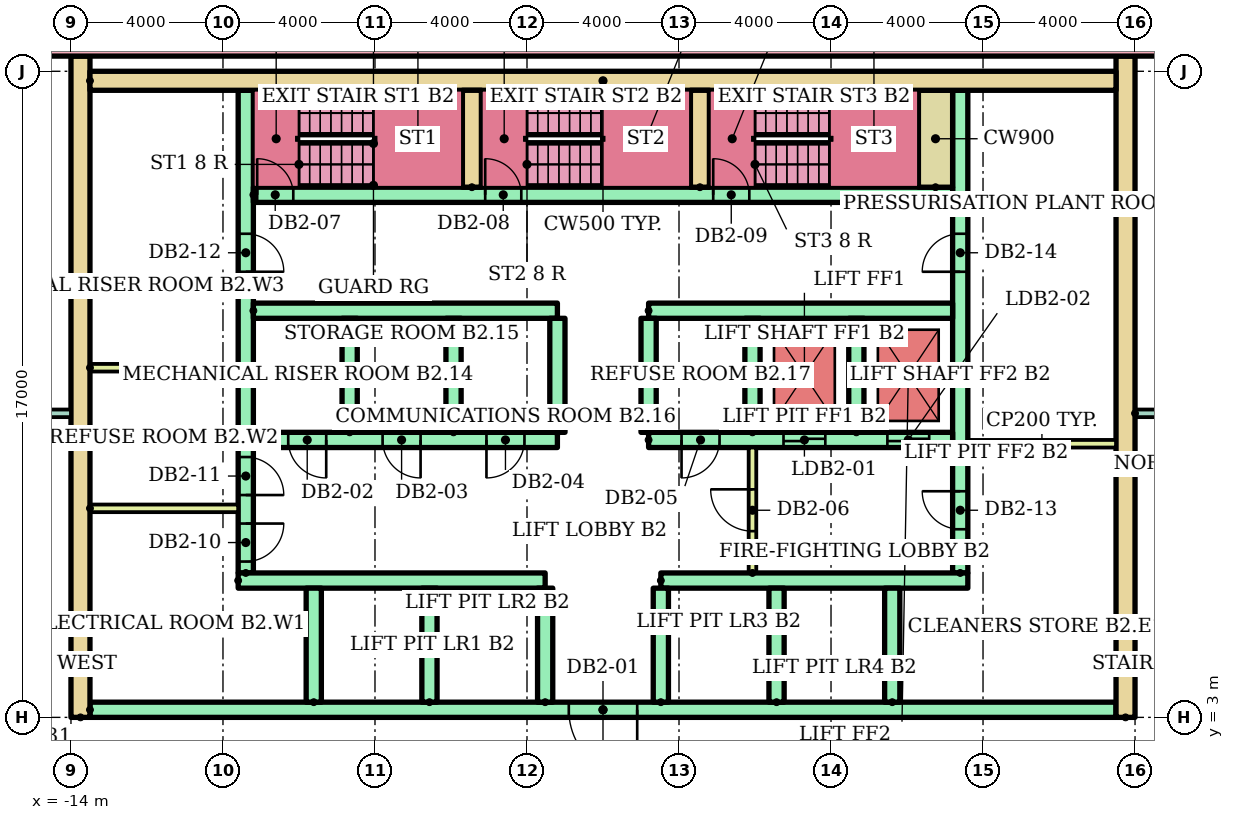
"""IFC4 building model, lengths in metres.
Left out: names, types, materials, properties, quantities, classifications, styles, units other than length and angle.
Written with IfcOpenShell. Run it as: python <this file> out.ifc"""

import sys

from ifc_helpers import new_model, si_unit, direction, frame, frame_2d, origin, place, context, subcontext, project, spatial, rectangle, extrude, element, fill, save


model = new_model("IFC4")
c1 = context("Model", 3, precision=1e-05, world=origin(), true_north=direction((0.0, 1.0)))
c2 = subcontext(c1, "Body", "Model", "MODEL_VIEW")
j1 = project(units=[si_unit("LENGTHUNIT", "METRE"), si_unit("PLANEANGLEUNIT", "RADIAN")], contexts=[c1])
p1 = place(None, origin())
s1 = spatial("IfcSite", under=j1, at=p1, CompositionType="ELEMENT")
p2 = place(p1, origin())
s2 = spatial("IfcBuilding", under=s1, at=p2, CompositionType="ELEMENT")
p3 = place(p2, frame((0.0, 0.0, -10.0)))
s3 = spatial("IfcBuildingStorey", under=s2, at=p3, CompositionType="ELEMENT", Elevation=-10.0)
p4 = place(p3, frame((-41.0, 20.7, -0.3)))
e1 = element("IfcWall", 1, at=p4, inside=s3, PredefinedType="SOLIDWALL", context=c2, shape_type="SweptSolid", body=[
    extrude(rectangle(XDim=82.0, YDim=0.6, at=frame_2d((41.0, 0.0))), origin(), (0.0, 0.0, 1.0), 4.95),
])
for number, where, z_axis, x_axis in (
    (2, (-13.75, 3.0, 0.0), (0.0, 0.0, 1.0), (0.0, 1.0, 0.0)),
    (3, (13.75, 3.0, 0.0), (0.0, 0.0, 1.0), (0.0, 1.0, 0.0)),
):
    element("IfcWall", number, at=place(p3, frame(where, z_axis=z_axis, x_axis=x_axis)), inside=s3, PredefinedType="SHEAR", context=c2, shape_type="SweptSolid", body=[
        extrude(rectangle(XDim=17.4, YDim=0.5, at=frame_2d((8.7, 0.0))), origin(), (0.0, 0.0, 1.0), 4.65),
    ])
p5 = place(p3, frame((-13.5, 19.75, 0.0)))
e4 = element("IfcWall", 4, at=p5, inside=s3, PredefinedType="SHEAR", context=c2, shape_type="SweptSolid", body=[
    extrude(rectangle(XDim=27.0, YDim=0.5, at=frame_2d((13.5, 0.0))), origin(), (0.0, 0.0, 1.0), 4.65),
])
p6 = place(p3, frame((-9.4, 6.8, 0.0), z_axis=(0.0, 0.0, 1.0), x_axis=(0.0, 1.0, 0.0)))
e5 = element("IfcWall", 5, at=p6, inside=s3, PredefinedType="SHEAR", context=c2, shape_type="SweptSolid", body=[
    extrude(rectangle(XDim=12.7, YDim=0.4, at=frame_2d((6.35, 0.0))), origin(), (0.0, 0.0, 1.0), 4.65),
])
p7 = place(p6, frame((0.3, 0.0, 0.0)))
e6 = element("IfcOpeningElement", 6, at=p7, cuts=e5, PredefinedType="OPENING", context=c2, shape_type="SweptSolid", body=[
    extrude(rectangle(XDim=1.0, YDim=2.1, at=frame_2d((0.5, 1.05))), frame((0.0, 0.21, 0.0), z_axis=(0.0, -1.0, 0.0), x_axis=(1.0, 0.0, 0.0)), (0.0, 0.0, 1.0), 0.42),
])
p8 = place(p6, frame((2.05, 0.0, 0.0)))
e7 = element("IfcOpeningElement", 7, at=p8, cuts=e5, PredefinedType="OPENING", context=c2, shape_type="SweptSolid", body=[
    extrude(rectangle(XDim=1.0, YDim=2.1, at=frame_2d((0.5, 1.05))), frame((0.0, 0.21, 0.0), z_axis=(0.0, -1.0, 0.0), x_axis=(1.0, 0.0, 0.0)), (0.0, 0.0, 1.0), 0.42),
])
p9 = place(p6, frame((7.925, 0.0, 0.0)))
e8 = element("IfcOpeningElement", 8, at=p9, cuts=e5, PredefinedType="OPENING", context=c2, shape_type="SweptSolid", body=[
    extrude(rectangle(XDim=1.0, YDim=2.1, at=frame_2d((0.5, 1.05))), frame((0.0, 0.21, 0.0), z_axis=(0.0, -1.0, 0.0), x_axis=(1.0, 0.0, 0.0)), (0.0, 0.0, 1.0), 0.42),
])
p10 = place(p3, frame((9.4, 6.8, 0.0), z_axis=(0.0, 0.0, 1.0), x_axis=(0.0, 1.0, 0.0)))
e9 = element("IfcWall", 9, at=p10, inside=s3, PredefinedType="SHEAR", context=c2, shape_type="SweptSolid", body=[
    extrude(rectangle(XDim=12.7, YDim=0.4, at=frame_2d((6.35, 0.0))), origin(), (0.0, 0.0, 1.0), 4.65),
])
p11 = place(p10, frame((1.15, 0.0, 0.0)))
e10 = element("IfcOpeningElement", 10, at=p11, cuts=e9, PredefinedType="OPENING", context=c2, shape_type="SweptSolid", body=[
    extrude(rectangle(XDim=1.0, YDim=2.1, at=frame_2d((0.5, 1.05))), frame((0.0, 0.21, 0.0), z_axis=(0.0, -1.0, 0.0), x_axis=(1.0, 0.0, 0.0)), (0.0, 0.0, 1.0), 0.42),
])
p12 = place(p10, frame((7.925, 0.0, 0.0)))
e11 = element("IfcOpeningElement", 11, at=p12, cuts=e9, PredefinedType="OPENING", context=c2, shape_type="SweptSolid", body=[
    extrude(rectangle(XDim=1.0, YDim=2.1, at=frame_2d((0.5, 1.05))), frame((0.0, 0.21, 0.0), z_axis=(0.0, -1.0, 0.0), x_axis=(1.0, 0.0, 0.0)), (0.0, 0.0, 1.0), 0.42),
])
p13 = place(p3, frame((-13.5, 3.2, 0.0)))
e12 = element("IfcWall", 12, at=p13, inside=s3, PredefinedType="SHEAR", context=c2, shape_type="SweptSolid", body=[
    extrude(rectangle(XDim=27.0, YDim=0.4, at=frame_2d((13.5, 0.0))), origin(), (0.0, 0.0, 1.0), 4.65),
])
p14 = place(p13, frame((12.6, 0.0, 0.0)))
e13 = element("IfcOpeningElement", 13, at=p14, cuts=e12, PredefinedType="OPENING", context=c2, shape_type="SweptSolid", body=[
    extrude(rectangle(XDim=1.8, YDim=2.1, at=frame_2d((0.9, 1.05))), frame((0.0, 0.21, 0.0), z_axis=(0.0, -1.0, 0.0), x_axis=(1.0, 0.0, 0.0)), (0.0, 0.0, 1.0), 0.42),
])
for number, where in (
    (14, (-9.6, 6.6, 0.0)),
    (15, (1.522, 6.6, 0.0)),
):
    element("IfcWall", number, at=place(p3, frame(where)), inside=s3, PredefinedType="SHEAR", context=c2, shape_type="SweptSolid", body=[
        extrude(rectangle(XDim=8.078, YDim=0.4, at=frame_2d((4.039, 0.0))), origin(), (0.0, 0.0, 1.0), 4.65),
    ])
for number, where, z_axis, x_axis in (
    (16, (-7.611, 3.4, 0.0), (0.0, 0.0, 1.0), (0.0, 1.0, 0.0)),
    (17, (-4.567, 3.4, 0.0), (0.0, 0.0, 1.0), (0.0, 1.0, 0.0)),
    (18, (-1.522, 3.4, 0.0), (0.0, 0.0, 1.0), (0.0, 1.0, 0.0)),
    (19, (1.522, 3.4, 0.0), (0.0, 0.0, 1.0), (0.0, 1.0, 0.0)),
    (20, (4.567, 3.4, 0.0), (0.0, 0.0, 1.0), (0.0, 1.0, 0.0)),
    (21, (7.611, 3.4, 0.0), (0.0, 0.0, 1.0), (0.0, 1.0, 0.0)),
):
    element("IfcWall", number, at=place(p3, frame(where, z_axis=z_axis, x_axis=x_axis)), inside=s3, PredefinedType="SHEAR", context=c2, shape_type="SweptSolid", body=[
        extrude(rectangle(XDim=3.0, YDim=0.4, at=frame_2d((1.5, 0.0))), origin(), (0.0, 0.0, 1.0), 4.65),
    ])
p15 = place(p3, frame((-9.2, 10.3, 0.0)))
e22 = element("IfcWall", 22, at=p15, inside=s3, PredefinedType="SHEAR", context=c2, shape_type="SweptSolid", body=[
    extrude(rectangle(XDim=8.0, YDim=0.4, at=frame_2d((4.0, 0.0))), origin(), (0.0, 0.0, 1.0), 4.65),
])
p16 = place(p15, frame((0.917, 0.0, 0.0)))
e23 = element("IfcOpeningElement", 23, at=p16, cuts=e22, PredefinedType="OPENING", context=c2, shape_type="SweptSolid", body=[
    extrude(rectangle(XDim=1.0, YDim=2.1, at=frame_2d((0.5, 1.05))), frame((0.0, 0.21, 0.0), z_axis=(0.0, -1.0, 0.0), x_axis=(1.0, 0.0, 0.0)), (0.0, 0.0, 1.0), 0.42),
])
p17 = place(p15, frame((3.4, 0.0, 0.0)))
e24 = element("IfcOpeningElement", 24, at=p17, cuts=e22, PredefinedType="OPENING", context=c2, shape_type="SweptSolid", body=[
    extrude(rectangle(XDim=1.0, YDim=2.1, at=frame_2d((0.5, 1.05))), frame((0.0, 0.21, 0.0), z_axis=(0.0, -1.0, 0.0), x_axis=(1.0, 0.0, 0.0)), (0.0, 0.0, 1.0), 0.42),
])
p18 = place(p15, frame((6.133, 0.0, 0.0)))
e25 = element("IfcOpeningElement", 25, at=p18, cuts=e22, PredefinedType="OPENING", context=c2, shape_type="SweptSolid", body=[
    extrude(rectangle(XDim=1.0, YDim=2.1, at=frame_2d((0.5, 1.05))), frame((0.0, 0.21, 0.0), z_axis=(0.0, -1.0, 0.0), x_axis=(1.0, 0.0, 0.0)), (0.0, 0.0, 1.0), 0.42),
])
p19 = place(p3, frame((-9.2, 13.7, 0.0)))
e26 = element("IfcWall", 26, at=p19, inside=s3, PredefinedType="SHEAR", context=c2, shape_type="SweptSolid", body=[
    extrude(rectangle(XDim=8.0, YDim=0.4, at=frame_2d((4.0, 0.0))), origin(), (0.0, 0.0, 1.0), 4.65),
])
p20 = place(p3, frame((1.2, 10.3, 0.0)))
e27 = element("IfcWall", 27, at=p20, inside=s3, PredefinedType="SHEAR", context=c2, shape_type="SweptSolid", body=[
    extrude(rectangle(XDim=8.0, YDim=0.4, at=frame_2d((4.0, 0.0))), origin(), (0.0, 0.0, 1.0), 4.65),
])
p21 = place(p20, frame((3.55, 0.0, 0.0)))
e28 = element("IfcOpeningElement", 28, at=p21, cuts=e27, PredefinedType="OPENING", context=c2, shape_type="SweptSolid", body=[
    extrude(rectangle(XDim=1.1, YDim=2.1, at=frame_2d((0.55, 1.05))), frame((0.0, 0.21, 0.0), z_axis=(0.0, -1.0, 0.0), x_axis=(1.0, 0.0, 0.0)), (0.0, 0.0, 1.0), 0.42),
])
p22 = place(p20, frame((6.283, 0.0, 0.0)))
e29 = element("IfcOpeningElement", 29, at=p22, cuts=e27, PredefinedType="OPENING", context=c2, shape_type="SweptSolid", body=[
    extrude(rectangle(XDim=1.1, YDim=2.1, at=frame_2d((0.55, 1.05))), frame((0.0, 0.21, 0.0), z_axis=(0.0, -1.0, 0.0), x_axis=(1.0, 0.0, 0.0)), (0.0, 0.0, 1.0), 0.42),
])
p23 = place(p20, frame((0.867, 0.0, 0.0)))
e30 = element("IfcOpeningElement", 30, at=p23, cuts=e27, PredefinedType="OPENING", context=c2, shape_type="SweptSolid", body=[
    extrude(rectangle(XDim=1.0, YDim=2.1, at=frame_2d((0.5, 1.05))), frame((0.0, 0.21, 0.0), z_axis=(0.0, -1.0, 0.0), x_axis=(1.0, 0.0, 0.0)), (0.0, 0.0, 1.0), 0.42),
])
p24 = place(p3, frame((1.2, 13.7, 0.0)))
e31 = element("IfcWall", 31, at=p24, inside=s3, PredefinedType="SHEAR", context=c2, shape_type="SweptSolid", body=[
    extrude(rectangle(XDim=8.0, YDim=0.4, at=frame_2d((4.0, 0.0))), origin(), (0.0, 0.0, 1.0), 4.65),
])
for number, where, z_axis, x_axis in (
    (32, (-6.667, 10.5, 0.0), (0.0, 0.0, 1.0), (0.0, 1.0, 0.0)),
    (33, (-3.933, 10.5, 0.0), (0.0, 0.0, 1.0), (0.0, 1.0, 0.0)),
    (34, (-1.2, 10.5, 0.0), (0.0, 0.0, 1.0), (0.0, 1.0, 0.0)),
    (35, (1.2, 10.5, 0.0), (0.0, 0.0, 1.0), (0.0, 1.0, 0.0)),
    (36, (3.933, 10.5, 0.0), (0.0, 0.0, 1.0), (0.0, 1.0, 0.0)),
    (37, (6.667, 10.5, 0.0), (0.0, 0.0, 1.0), (0.0, 1.0, 0.0)),
):
    element("IfcWall", number, at=place(p3, frame(where, z_axis=z_axis, x_axis=x_axis)), inside=s3, PredefinedType="SHEAR", context=c2, shape_type="SweptSolid", body=[
        extrude(rectangle(XDim=3.0, YDim=0.4, at=frame_2d((1.5, 0.0))), origin(), (0.0, 0.0, 1.0), 4.65),
    ])
p25 = place(p3, frame((3.933, 6.8, 0.0), z_axis=(0.0, 0.0, 1.0), x_axis=(0.0, 1.0, 0.0)))
e38 = element("IfcWall", 38, at=p25, inside=s3, PredefinedType="PARTITIONING", context=c2, shape_type="SweptSolid", body=[
    extrude(rectangle(XDim=3.3, YDim=0.2, at=frame_2d((1.65, 0.0))), origin(), (0.0, 0.0, 1.0), 4.65),
])
p26 = place(p25, frame((1.1, 0.0, 0.0)))
e39 = element("IfcOpeningElement", 39, at=p26, cuts=e38, PredefinedType="OPENING", context=c2, shape_type="SweptSolid", body=[
    extrude(rectangle(XDim=1.1, YDim=2.1, at=frame_2d((0.55, 1.05))), frame((0.0, 0.11, 0.0), z_axis=(0.0, -1.0, 0.0), x_axis=(1.0, 0.0, 0.0)), (0.0, 0.0, 1.0), 0.22),
])
p27 = place(p3, frame((-9.2, 16.75, 0.0)))
e40 = element("IfcWall", 40, at=p27, inside=s3, PredefinedType="SHEAR", context=c2, shape_type="SweptSolid", body=[
    extrude(rectangle(XDim=18.4, YDim=0.4, at=frame_2d((9.2, 0.0))), origin(), (0.0, 0.0, 1.0), 4.65),
])
p28 = place(p27, frame((0.1, 0.0, 0.0)))
e41 = element("IfcOpeningElement", 41, at=p28, cuts=e40, PredefinedType="OPENING", context=c2, shape_type="SweptSolid", body=[
    extrude(rectangle(XDim=0.95, YDim=2.1, at=frame_2d((0.475, 1.05))), frame((0.0, 0.21, 0.0), z_axis=(0.0, -1.0, 0.0), x_axis=(1.0, 0.0, 0.0)), (0.0, 0.0, 1.0), 0.42),
])
p29 = place(p27, frame((6.1, 0.0, 0.0)))
e42 = element("IfcOpeningElement", 42, at=p29, cuts=e40, PredefinedType="OPENING", context=c2, shape_type="SweptSolid", body=[
    extrude(rectangle(XDim=0.95, YDim=2.1, at=frame_2d((0.475, 1.05))), frame((0.0, 0.21, 0.0), z_axis=(0.0, -1.0, 0.0), x_axis=(1.0, 0.0, 0.0)), (0.0, 0.0, 1.0), 0.42),
])
p30 = place(p27, frame((12.1, 0.0, 0.0)))
e43 = element("IfcOpeningElement", 43, at=p30, cuts=e40, PredefinedType="OPENING", context=c2, shape_type="SweptSolid", body=[
    extrude(rectangle(XDim=0.95, YDim=2.1, at=frame_2d((0.475, 1.05))), frame((0.0, 0.21, 0.0), z_axis=(0.0, -1.0, 0.0), x_axis=(1.0, 0.0, 0.0)), (0.0, 0.0, 1.0), 0.42),
])
for number, where, z_axis, x_axis in (
    (44, (-3.45, 16.95, 0.0), (0.0, 0.0, 1.0), (0.0, 1.0, 0.0)),
    (45, (2.55, 16.95, 0.0), (0.0, 0.0, 1.0), (0.0, 1.0, 0.0)),
):
    element("IfcWall", number, at=place(p3, frame(where, z_axis=z_axis, x_axis=x_axis)), inside=s3, PredefinedType="SHEAR", context=c2, shape_type="SweptSolid", body=[
        extrude(rectangle(XDim=2.55, YDim=0.5, at=frame_2d((1.275, 0.0))), origin(), (0.0, 0.0, 1.0), 4.65),
    ])
p31 = place(p3, frame((8.75, 16.95, 0.0), z_axis=(0.0, 0.0, 1.0), x_axis=(0.0, 1.0, 0.0)))
e46 = element("IfcWall", 46, at=p31, inside=s3, PredefinedType="SHEAR", context=c2, shape_type="SweptSolid", body=[
    extrude(rectangle(XDim=2.55, YDim=0.9, at=frame_2d((1.275, 0.0))), origin(), (0.0, 0.0, 1.0), 4.65),
])
for number, where in (
    (47, (-13.5, 8.5, 0.0)),
    (48, (-13.5, 12.2, 0.0)),
    (49, (9.6, 10.2, 0.0)),
):
    element("IfcWall", number, at=place(p3, frame(where)), inside=s3, PredefinedType="PARTITIONING", context=c2, shape_type="SweptSolid", body=[
        extrude(rectangle(XDim=3.9, YDim=0.2, at=frame_2d((1.95, 0.0))), origin(), (0.0, 0.0, 1.0), 4.65),
    ])
p32 = place(p3, frame((-21.45, 11.0, 0.0)))
e50 = element("IfcWall", 50, at=p32, inside=s3, PredefinedType="PARTITIONING", context=c2, shape_type="SweptSolid", body=[
    extrude(rectangle(XDim=7.45, YDim=0.2, at=frame_2d((3.725, 0.0))), origin(), (0.0, 0.0, 1.0), 4.65),
])
p33 = place(p32, frame((0.35, 0.0, 0.0)))
e51 = element("IfcOpeningElement", 51, at=p33, cuts=e50, PredefinedType="OPENING", context=c2, shape_type="SweptSolid", body=[
    extrude(rectangle(XDim=1.4, YDim=2.1, at=frame_2d((0.7, 1.05))), frame((0.0, 0.11, 0.0), z_axis=(0.0, -1.0, 0.0), x_axis=(1.0, 0.0, 0.0)), (0.0, 0.0, 1.0), 0.22),
])
p34 = place(p3, frame((14.0, 11.0, 0.0)))
e52 = element("IfcWall", 52, at=p34, inside=s3, PredefinedType="PARTITIONING", context=c2, shape_type="SweptSolid", body=[
    extrude(rectangle(XDim=3.45, YDim=0.2, at=frame_2d((1.725, 0.0))), origin(), (0.0, 0.0, 1.0), 4.65),
])
p35 = place(p14, frame((1.8, 0.0, 0.0), z_axis=(0.0, 0.0, 1.0), x_axis=(-1.0, 0.0, 0.0)))
e53 = element("IfcDoor", 53, at=p35, inside=s3, OperationType="DOUBLE_DOOR_SINGLE_SWING", PredefinedType="DOOR", context=c2, shape_type="SweptSolid", body=[
    extrude(rectangle(XDim=1.8, YDim=2.1, at=frame_2d((0.9, 1.05))), frame((0.0, 0.025, 0.0), z_axis=(0.0, -1.0, 0.0), x_axis=(1.0, 0.0, 0.0)), (0.0, 0.0, 1.0), 0.05),
])
fill(e13, e53)
p36 = place(p21, origin())
e54 = element("IfcDoor", 54, at=p36, inside=s3, OperationType="SLIDING_TO_LEFT", PredefinedType="DOOR", context=c2, shape_type="SweptSolid", body=[
    extrude(rectangle(XDim=1.1, YDim=2.1, at=frame_2d((0.55, 1.05))), frame((0.0, 0.025, 0.0), z_axis=(0.0, -1.0, 0.0), x_axis=(1.0, 0.0, 0.0)), (0.0, 0.0, 1.0), 0.05),
])
fill(e28, e54)
p37 = place(p22, origin())
e55 = element("IfcDoor", 55, at=p37, inside=s3, OperationType="SLIDING_TO_LEFT", PredefinedType="DOOR", context=c2, shape_type="SweptSolid", body=[
    extrude(rectangle(XDim=1.1, YDim=2.1, at=frame_2d((0.55, 1.05))), frame((0.0, 0.025, 0.0), z_axis=(0.0, -1.0, 0.0), x_axis=(1.0, 0.0, 0.0)), (0.0, 0.0, 1.0), 0.05),
])
fill(e29, e55)
p38 = place(p16, frame((1.0, 0.0, 0.0), z_axis=(0.0, 0.0, 1.0), x_axis=(-1.0, 0.0, 0.0)))
e56 = element("IfcDoor", 56, at=p38, inside=s3, OperationType="SINGLE_SWING_RIGHT", PredefinedType="DOOR", context=c2, shape_type="SweptSolid", body=[
    extrude(rectangle(XDim=1.0, YDim=2.1, at=frame_2d((0.5, 1.05))), frame((0.0, 0.025, 0.0), z_axis=(0.0, -1.0, 0.0), x_axis=(1.0, 0.0, 0.0)), (0.0, 0.0, 1.0), 0.05),
])
fill(e23, e56)
p39 = place(p17, frame((1.0, 0.0, 0.0), z_axis=(0.0, 0.0, 1.0), x_axis=(-1.0, 0.0, 0.0)))
e57 = element("IfcDoor", 57, at=p39, inside=s3, OperationType="SINGLE_SWING_RIGHT", PredefinedType="DOOR", context=c2, shape_type="SweptSolid", body=[
    extrude(rectangle(XDim=1.0, YDim=2.1, at=frame_2d((0.5, 1.05))), frame((0.0, 0.025, 0.0), z_axis=(0.0, -1.0, 0.0), x_axis=(1.0, 0.0, 0.0)), (0.0, 0.0, 1.0), 0.05),
])
fill(e24, e57)
p40 = place(p18, frame((1.0, 0.0, 0.0), z_axis=(0.0, 0.0, 1.0), x_axis=(-1.0, 0.0, 0.0)))
e58 = element("IfcDoor", 58, at=p40, inside=s3, OperationType="SINGLE_SWING_LEFT", PredefinedType="DOOR", context=c2, shape_type="SweptSolid", body=[
    extrude(rectangle(XDim=1.0, YDim=2.1, at=frame_2d((0.5, 1.05))), frame((0.0, 0.025, 0.0), z_axis=(0.0, -1.0, 0.0), x_axis=(1.0, 0.0, 0.0)), (0.0, 0.0, 1.0), 0.05),
])
fill(e25, e58)
p41 = place(p23, frame((1.0, 0.0, 0.0), z_axis=(0.0, 0.0, 1.0), x_axis=(-1.0, 0.0, 0.0)))
e59 = element("IfcDoor", 59, at=p41, inside=s3, OperationType="SINGLE_SWING_LEFT", PredefinedType="DOOR", context=c2, shape_type="SweptSolid", body=[
    extrude(rectangle(XDim=1.0, YDim=2.1, at=frame_2d((0.5, 1.05))), frame((0.0, 0.025, 0.0), z_axis=(0.0, -1.0, 0.0), x_axis=(1.0, 0.0, 0.0)), (0.0, 0.0, 1.0), 0.05),
])
fill(e30, e59)
p42 = place(p26, origin())
e60 = element("IfcDoor", 60, at=p42, inside=s3, OperationType="SINGLE_SWING_RIGHT", PredefinedType="DOOR", context=c2, shape_type="SweptSolid", body=[
    extrude(rectangle(XDim=1.1, YDim=2.1, at=frame_2d((0.55, 1.05))), frame((0.0, 0.025, 0.0), z_axis=(0.0, -1.0, 0.0), x_axis=(1.0, 0.0, 0.0)), (0.0, 0.0, 1.0), 0.05),
])
fill(e39, e60)
p43 = place(p28, origin())
e61 = element("IfcDoor", 61, at=p43, inside=s3, OperationType="SINGLE_SWING_LEFT", PredefinedType="DOOR", context=c2, shape_type="SweptSolid", body=[
    extrude(rectangle(XDim=0.95, YDim=2.1, at=frame_2d((0.475, 1.05))), frame((0.0, 0.025, 0.0), z_axis=(0.0, -1.0, 0.0), x_axis=(1.0, 0.0, 0.0)), (0.0, 0.0, 1.0), 0.05),
])
fill(e41, e61)
p44 = place(p29, origin())
e62 = element("IfcDoor", 62, at=p44, inside=s3, OperationType="SINGLE_SWING_LEFT", PredefinedType="DOOR", context=c2, shape_type="SweptSolid", body=[
    extrude(rectangle(XDim=0.95, YDim=2.1, at=frame_2d((0.475, 1.05))), frame((0.0, 0.025, 0.0), z_axis=(0.0, -1.0, 0.0), x_axis=(1.0, 0.0, 0.0)), (0.0, 0.0, 1.0), 0.05),
])
fill(e42, e62)
p45 = place(p30, origin())
e63 = element("IfcDoor", 63, at=p45, inside=s3, OperationType="SINGLE_SWING_LEFT", PredefinedType="DOOR", context=c2, shape_type="SweptSolid", body=[
    extrude(rectangle(XDim=0.95, YDim=2.1, at=frame_2d((0.475, 1.05))), frame((0.0, 0.025, 0.0), z_axis=(0.0, -1.0, 0.0), x_axis=(1.0, 0.0, 0.0)), (0.0, 0.0, 1.0), 0.05),
])
fill(e43, e63)
p46 = place(p7, frame((1.0, 0.0, 0.0), z_axis=(0.0, 0.0, 1.0), x_axis=(-1.0, 0.0, 0.0)))
e64 = element("IfcDoor", 64, at=p46, inside=s3, OperationType="SINGLE_SWING_RIGHT", PredefinedType="DOOR", context=c2, shape_type="SweptSolid", body=[
    extrude(rectangle(XDim=1.0, YDim=2.1, at=frame_2d((0.5, 1.05))), frame((0.0, 0.025, 0.0), z_axis=(0.0, -1.0, 0.0), x_axis=(1.0, 0.0, 0.0)), (0.0, 0.0, 1.0), 0.05),
])
fill(e6, e64)
p47 = place(p8, frame((1.0, 0.0, 0.0), z_axis=(0.0, 0.0, 1.0), x_axis=(-1.0, 0.0, 0.0)))
e65 = element("IfcDoor", 65, at=p47, inside=s3, OperationType="SINGLE_SWING_LEFT", PredefinedType="DOOR", context=c2, shape_type="SweptSolid", body=[
    extrude(rectangle(XDim=1.0, YDim=2.1, at=frame_2d((0.5, 1.05))), frame((0.0, 0.025, 0.0), z_axis=(0.0, -1.0, 0.0), x_axis=(1.0, 0.0, 0.0)), (0.0, 0.0, 1.0), 0.05),
])
fill(e7, e65)
p48 = place(p9, frame((1.0, 0.0, 0.0), z_axis=(0.0, 0.0, 1.0), x_axis=(-1.0, 0.0, 0.0)))
e66 = element("IfcDoor", 66, at=p48, inside=s3, OperationType="SINGLE_SWING_LEFT", PredefinedType="DOOR", context=c2, shape_type="SweptSolid", body=[
    extrude(rectangle(XDim=1.0, YDim=2.1, at=frame_2d((0.5, 1.05))), frame((0.0, 0.025, 0.0), z_axis=(0.0, -1.0, 0.0), x_axis=(1.0, 0.0, 0.0)), (0.0, 0.0, 1.0), 0.05),
])
fill(e8, e66)
p49 = place(p11, origin())
e67 = element("IfcDoor", 67, at=p49, inside=s3, OperationType="SINGLE_SWING_RIGHT", PredefinedType="DOOR", context=c2, shape_type="SweptSolid", body=[
    extrude(rectangle(XDim=1.0, YDim=2.1, at=frame_2d((0.5, 1.05))), frame((0.0, 0.025, 0.0), z_axis=(0.0, -1.0, 0.0), x_axis=(1.0, 0.0, 0.0)), (0.0, 0.0, 1.0), 0.05),
])
fill(e10, e67)
p50 = place(p12, origin())
e68 = element("IfcDoor", 68, at=p50, inside=s3, OperationType="SINGLE_SWING_LEFT", PredefinedType="DOOR", context=c2, shape_type="SweptSolid", body=[
    extrude(rectangle(XDim=1.0, YDim=2.1, at=frame_2d((0.5, 1.05))), frame((0.0, 0.025, 0.0), z_axis=(0.0, -1.0, 0.0), x_axis=(1.0, 0.0, 0.0)), (0.0, 0.0, 1.0), 0.05),
])
fill(e11, e68)
save(model, sys.argv[1])
